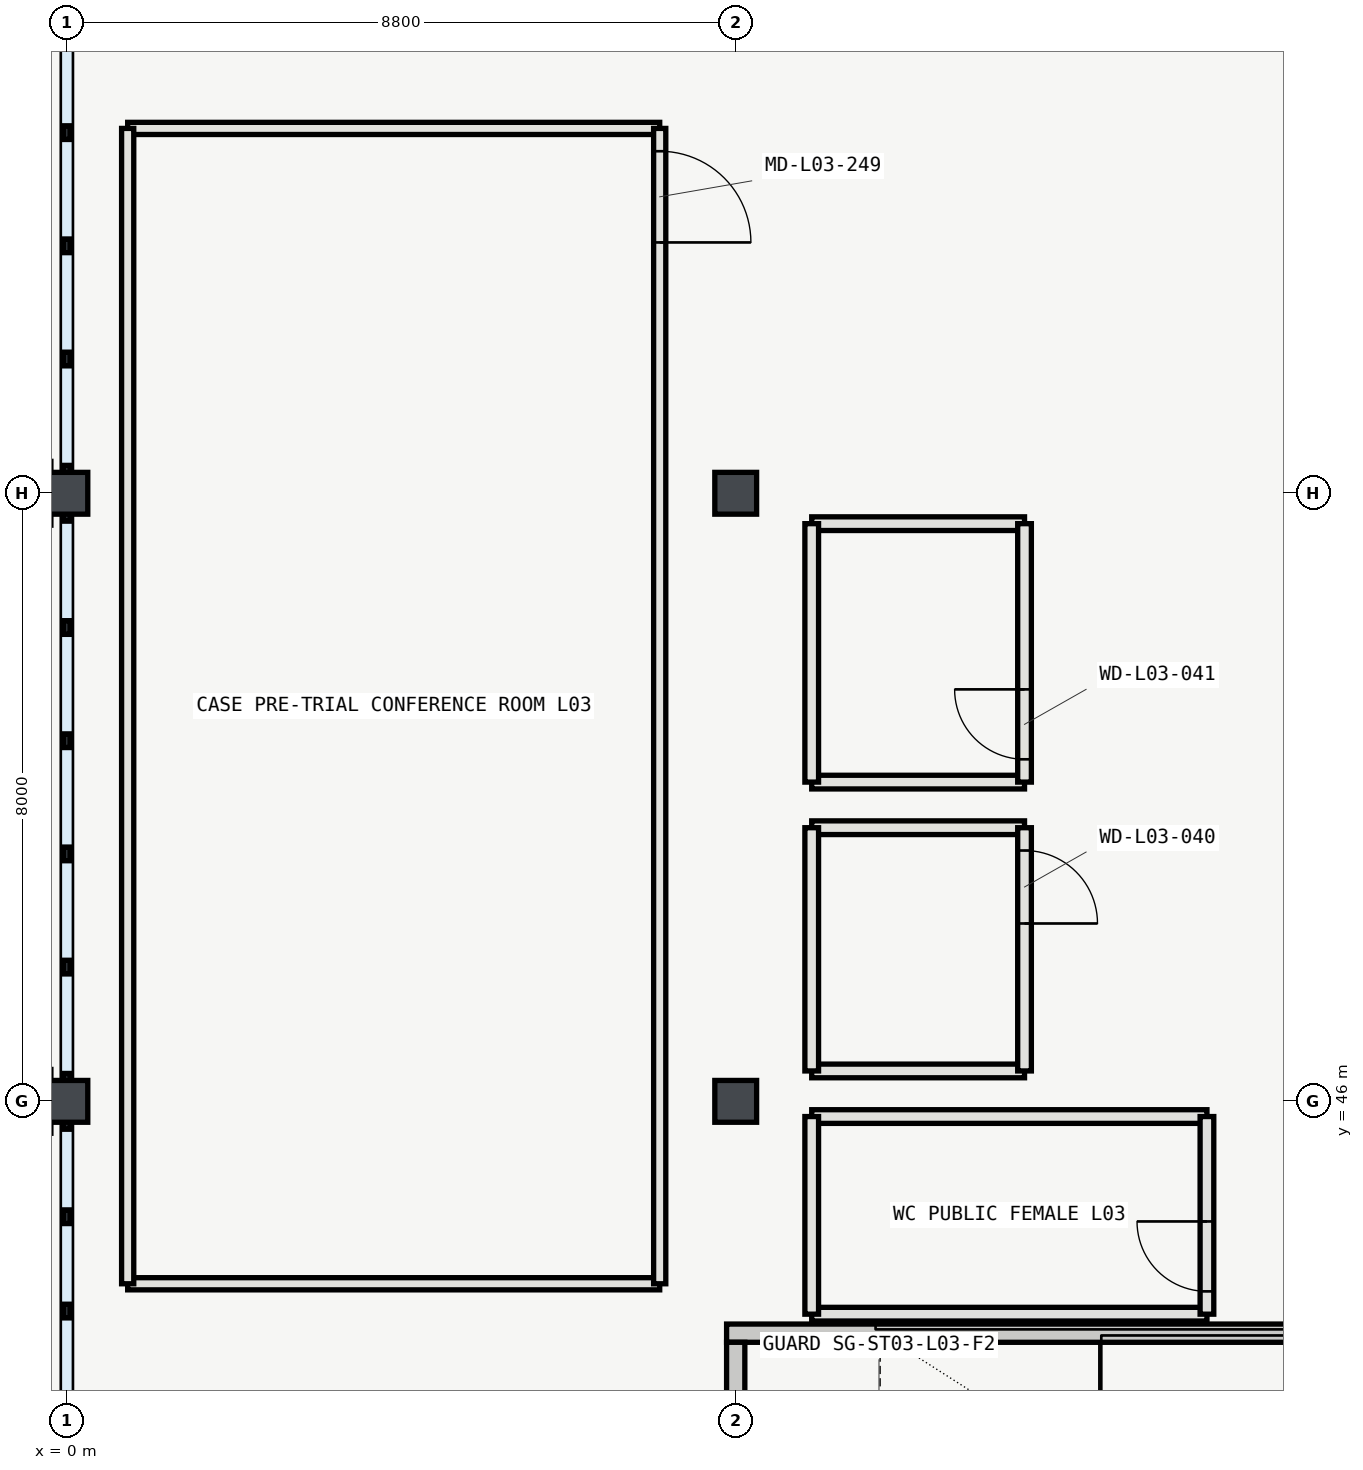
"""IFC4 building model, lengths in metres.
Left out: names, types, materials, properties, quantities, classifications, styles, units other than length and angle.
Written with IfcOpenShell. Run it as: python <this file> out.ifc"""

import sys

from ifc_helpers import new_model, si_unit, direction, frame, frame_2d, origin, origin_2d, place, context, subcontext, project, spatial, rectangle, hollow_rectangle, extrude, element, fill, save


model = new_model("IFC4")
c1 = context("Model", 3, precision=1e-05, world=origin(), true_north=direction((0.0, 1.0)))
c2 = subcontext(c1, "Body", "Model", "MODEL_VIEW")
j1 = project(units=[si_unit("LENGTHUNIT", "METRE"), si_unit("PLANEANGLEUNIT", "RADIAN")], contexts=[c1])
p1 = place(None, origin())
s1 = spatial("IfcSite", under=j1, at=p1, CompositionType="ELEMENT")
p2 = place(p1, origin())
s2 = spatial("IfcBuilding", under=s1, at=p2, CompositionType="ELEMENT")
p3 = place(p2, frame((0.0, 0.0, 16.2)))
s3 = spatial("IfcBuildingStorey", under=s2, at=p3, CompositionType="ELEMENT", Elevation=16.2)
for number, where, z_axis, x_axis in (
    (1, (0.0, 46.0, 0.0), (0.0, 0.0, 1.0), (1.0, 0.0, 0.0)),
    (2, (0.0, 54.0, 0.0), (0.0, 0.0, 1.0), (1.0, 0.0, 0.0)),
    (3, (8.8, 46.0, 0.0), (0.0, 0.0, 1.0), (1.0, 0.0, 0.0)),
    (4, (8.8, 54.0, 0.0), (0.0, 0.0, 1.0), (1.0, 0.0, 0.0)),
):
    element("IfcColumn", number, at=place(p3, frame(where, z_axis=z_axis, x_axis=x_axis)), inside=s3, PredefinedType="COLUMN", context=c2, shape_type="SweptSolid", body=[
        extrude(hollow_rectangle(XDim=0.55, YDim=0.55, WallThickness=0.022, InnerFilletRadius=0.022, OuterFilletRadius=0.044, at=origin_2d()), origin(), (0.0, 0.0, 1.0), 4.2),
    ])
for number, where, z_axis, x_axis in (
    (5, (9.8, 46.4, 0.0), (0.0, 0.0, 1.0), (1.0, 0.0, 0.0)),
    (6, (12.6, 49.6, 0.0), (0.0, 0.0, 1.0), (-1.0, 0.0, 0.0)),
):
    element("IfcWall", number, at=place(p3, frame(where, z_axis=z_axis, x_axis=x_axis)), inside=s3, PredefinedType="PLUMBINGWALL", context=c2, shape_type="SweptSolid", body=[
        extrude(rectangle(XDim=2.8, YDim=0.18, at=frame_2d((1.4, 0.0))), origin(), (0.0, 0.0, 1.0), 3.92),
    ])
p4 = place(p3, frame((9.8, 49.6, 0.0), z_axis=(0.0, 0.0, 1.0), x_axis=(0.0, -1.0, 0.0)))
e7 = element("IfcWall", 7, at=p4, inside=s3, PredefinedType="PLUMBINGWALL", context=c2, shape_type="SweptSolid", body=[
    extrude(rectangle(XDim=3.2, YDim=0.18, at=frame_2d((1.6, 0.0))), origin(), (0.0, 0.0, 1.0), 3.92),
])
p5 = place(p3, frame((12.6, 46.4, 0.0), z_axis=(0.0, 0.0, 1.0), x_axis=(0.0, 1.0, 0.0)))
e8 = element("IfcWall", 8, at=p5, inside=s3, PredefinedType="PLUMBINGWALL", context=c2, shape_type="SweptSolid", body=[
    extrude(rectangle(XDim=3.2, YDim=0.18, at=frame_2d((1.6, 0.0))), origin(), (0.0, 0.0, 1.0), 3.92),
])
p6 = place(p5, frame((1.94, 0.0, 0.0)))
e9 = element("IfcOpeningElement", 9, at=p6, cuts=e8, PredefinedType="OPENING", context=c2, shape_type="SweptSolid", body=[
    extrude(rectangle(XDim=0.96, YDim=2.1, at=frame_2d((0.48, 1.05))), frame((0.0, 0.1, 0.0), z_axis=(0.0, -1.0, 0.0), x_axis=(1.0, 0.0, 0.0)), (0.0, 0.0, 1.0), 0.2),
])
for number, where, z_axis, x_axis in (
    (10, (9.8, 50.2, 0.0), (0.0, 0.0, 1.0), (1.0, 0.0, 0.0)),
    (11, (12.6, 53.6, 0.0), (0.0, 0.0, 1.0), (-1.0, 0.0, 0.0)),
):
    element("IfcWall", number, at=place(p3, frame(where, z_axis=z_axis, x_axis=x_axis)), inside=s3, PredefinedType="PLUMBINGWALL", context=c2, shape_type="SweptSolid", body=[
        extrude(rectangle(XDim=2.8, YDim=0.18, at=frame_2d((1.4, 0.0))), origin(), (0.0, 0.0, 1.0), 3.92),
    ])
p7 = place(p3, frame((9.8, 53.6, 0.0), z_axis=(0.0, 0.0, 1.0), x_axis=(0.0, -1.0, 0.0)))
e12 = element("IfcWall", 12, at=p7, inside=s3, PredefinedType="PLUMBINGWALL", context=c2, shape_type="SweptSolid", body=[
    extrude(rectangle(XDim=3.4, YDim=0.18, at=frame_2d((1.7, 0.0))), origin(), (0.0, 0.0, 1.0), 3.92),
])
p8 = place(p3, frame((12.6, 50.2, 0.0), z_axis=(0.0, 0.0, 1.0), x_axis=(0.0, 1.0, 0.0)))
e13 = element("IfcWall", 13, at=p8, inside=s3, PredefinedType="PLUMBINGWALL", context=c2, shape_type="SweptSolid", body=[
    extrude(rectangle(XDim=3.4, YDim=0.18, at=frame_2d((1.7, 0.0))), origin(), (0.0, 0.0, 1.0), 3.92),
])
p9 = place(p8, frame((0.3, 0.0, 0.0)))
e14 = element("IfcOpeningElement", 14, at=p9, cuts=e13, PredefinedType="OPENING", context=c2, shape_type="SweptSolid", body=[
    extrude(rectangle(XDim=0.92, YDim=2.1, at=frame_2d((0.46, 1.05))), frame((0.0, 0.1, 0.0), z_axis=(0.0, -1.0, 0.0), x_axis=(1.0, 0.0, 0.0)), (0.0, 0.0, 1.0), 0.2),
])
p10 = place(p3, frame((9.8, 43.2, 0.0), z_axis=(0.0, 0.0, 1.0), x_axis=(1.0, 0.0, 0.0)))
e15 = element("IfcWall", 15, at=p10, inside=s3, PredefinedType="PLUMBINGWALL", context=c2, shape_type="SweptSolid", body=[
    extrude(rectangle(XDim=5.2, YDim=0.18, at=frame_2d((2.6, 0.0))), origin(), (0.0, 0.0, 1.0), 3.92),
])
p11 = place(p3, frame((15.0, 45.8, 0.0), z_axis=(0.0, 0.0, 1.0), x_axis=(-1.0, 0.0, 0.0)))
e16 = element("IfcWall", 16, at=p11, inside=s3, PredefinedType="PLUMBINGWALL", context=c2, shape_type="SweptSolid", body=[
    extrude(rectangle(XDim=5.2, YDim=0.18, at=frame_2d((2.6, 0.0))), origin(), (0.0, 0.0, 1.0), 3.636),
])
p12 = place(p3, frame((9.8, 45.8, 0.0), z_axis=(0.0, 0.0, 1.0), x_axis=(0.0, -1.0, 0.0)))
e17 = element("IfcWall", 17, at=p12, inside=s3, PredefinedType="PLUMBINGWALL", context=c2, shape_type="SweptSolid", body=[
    extrude(rectangle(XDim=2.6, YDim=0.18, at=frame_2d((1.3, 0.0))), origin(), (0.0, 0.0, 1.0), 3.92),
])
p13 = place(p3, frame((15.0, 43.2, 0.0), z_axis=(0.0, 0.0, 1.0), x_axis=(0.0, 1.0, 0.0)))
e18 = element("IfcWall", 18, at=p13, inside=s3, PredefinedType="PLUMBINGWALL", context=c2, shape_type="SweptSolid", body=[
    extrude(rectangle(XDim=2.6, YDim=0.18, at=frame_2d((1.3, 0.0))), origin(), (0.0, 0.0, 1.0), 3.92),
])
p14 = place(p13, frame((0.3, 0.0, 0.0)))
e19 = element("IfcOpeningElement", 19, at=p14, cuts=e18, PredefinedType="OPENING", context=c2, shape_type="SweptSolid", body=[
    extrude(rectangle(XDim=0.92, YDim=2.1, at=frame_2d((0.46, 1.05))), frame((0.0, 0.1, 0.0), z_axis=(0.0, -1.0, 0.0), x_axis=(1.0, 0.0, 0.0)), (0.0, 0.0, 1.0), 0.2),
])
for number, where, z_axis, x_axis in (
    (20, (0.8, 43.6, 0.0), (0.0, 0.0, 1.0), (1.0, 0.0, 0.0)),
    (21, (7.8, 58.8, 0.0), (0.0, 0.0, 1.0), (-1.0, 0.0, 0.0)),
):
    element("IfcWall", number, at=place(p3, frame(where, z_axis=z_axis, x_axis=x_axis)), inside=s3, PredefinedType="PARTITIONING", context=c2, shape_type="SweptSolid", body=[
        extrude(rectangle(XDim=7.0, YDim=0.16, at=frame_2d((3.5, 0.0))), origin(), (0.0, 0.0, 1.0), 3.92),
    ])
p15 = place(p3, frame((0.8, 58.8, 0.0), z_axis=(0.0, 0.0, 1.0), x_axis=(0.0, -1.0, 0.0)))
e22 = element("IfcWall", 22, at=p15, inside=s3, PredefinedType="PARTITIONING", context=c2, shape_type="SweptSolid", body=[
    extrude(rectangle(XDim=15.2, YDim=0.16, at=frame_2d((7.6, 0.0))), origin(), (0.0, 0.0, 1.0), 3.92),
])
p16 = place(p3, frame((7.8, 43.6, 0.0), z_axis=(0.0, 0.0, 1.0), x_axis=(0.0, 1.0, 0.0)))
e23 = element("IfcWall", 23, at=p16, inside=s3, PredefinedType="PARTITIONING", context=c2, shape_type="SweptSolid", body=[
    extrude(rectangle(XDim=15.2, YDim=0.16, at=frame_2d((7.6, 0.0))), origin(), (0.0, 0.0, 1.0), 3.92),
])
p17 = place(p16, frame((13.7, 0.0, 0.0)))
e24 = element("IfcOpeningElement", 24, at=p17, cuts=e23, PredefinedType="OPENING", context=c2, shape_type="SweptSolid", body=[
    extrude(rectangle(XDim=1.2, YDim=2.2, at=frame_2d((0.6, 1.1))), frame((0.0, 0.09, 0.0), z_axis=(0.0, -1.0, 0.0), x_axis=(1.0, 0.0, 0.0)), (0.0, 0.0, 1.0), 0.18),
])
p18 = place(p3, frame((17.72, 42.95, 0.0), z_axis=(0.0, 0.0, 1.0), x_axis=(-1.0, 0.0, 0.0)))
e25 = element("IfcWall", 25, at=p18, inside=s3, PredefinedType="SHEAR", context=c2, shape_type="SweptSolid", body=[
    extrude(rectangle(XDim=9.04, YDim=0.24, at=frame_2d((4.52, 0.0))), origin(), (0.0, 0.0, 1.0), 3.95),
])
p19 = place(p3, frame((8.8, 38.67, 0.0), z_axis=(0.0, 0.0, 1.0), x_axis=(0.0, 1.0, 0.0)))
e26 = element("IfcWall", 26, at=p19, inside=s3, PredefinedType="SHEAR", context=c2, shape_type="SweptSolid", body=[
    extrude(rectangle(XDim=4.16, YDim=0.24, at=frame_2d((2.08, 0.0))), origin(), (0.0, 0.0, 1.0), 3.95),
])
p20 = place(p19, frame((1.405, 0.0, 0.0)))
e27 = element("IfcOpeningElement", 27, at=p20, cuts=e26, PredefinedType="OPENING", context=c2, shape_type="SweptSolid", body=[
    extrude(rectangle(XDim=1.35, YDim=2.2, at=frame_2d((0.675, 1.1))), frame((0.0, 0.13, 0.0), z_axis=(0.0, -1.0, 0.0), x_axis=(1.0, 0.0, 0.0)), (0.0, 0.0, 1.0), 0.26),
])
p21 = place(p6, origin())
e28 = element("IfcDoor", 28, at=p21, inside=s3, OperationType="SINGLE_SWING_LEFT", PredefinedType="DOOR", context=c2, shape_type="SweptSolid", body=[
    extrude(rectangle(XDim=0.96, YDim=2.1, at=frame_2d((0.48, 1.05))), frame((0.0, 0.025, 0.0), z_axis=(0.0, -1.0, 0.0), x_axis=(1.0, 0.0, 0.0)), (0.0, 0.0, 1.0), 0.05),
])
fill(e9, e28)
p22 = place(p9, origin())
e29 = element("IfcDoor", 29, at=p22, inside=s3, OperationType="SINGLE_SWING_RIGHT", PredefinedType="DOOR", context=c2, shape_type="SweptSolid", body=[
    extrude(rectangle(XDim=0.92, YDim=2.1, at=frame_2d((0.46, 1.05))), frame((0.0, 0.025, 0.0), z_axis=(0.0, -1.0, 0.0), x_axis=(1.0, 0.0, 0.0)), (0.0, 0.0, 1.0), 0.05),
])
fill(e14, e29)
p23 = place(p14, origin())
e30 = element("IfcDoor", 30, at=p23, inside=s3, OperationType="SINGLE_SWING_RIGHT", PredefinedType="DOOR", context=c2, shape_type="SweptSolid", body=[
    extrude(rectangle(XDim=0.92, YDim=2.1, at=frame_2d((0.46, 1.05))), frame((0.0, 0.025, 0.0), z_axis=(0.0, -1.0, 0.0), x_axis=(1.0, 0.0, 0.0)), (0.0, 0.0, 1.0), 0.05),
])
fill(e19, e30)
p24 = place(p17, origin())
e31 = element("IfcDoor", 31, at=p24, inside=s3, OperationType="SINGLE_SWING_LEFT", PredefinedType="DOOR", context=c2, shape_type="SweptSolid", body=[
    extrude(rectangle(XDim=1.2, YDim=2.2, at=frame_2d((0.6, 1.1))), frame((0.0, 0.025, 0.0), z_axis=(0.0, -1.0, 0.0), x_axis=(1.0, 0.0, 0.0)), (0.0, 0.0, 1.0), 0.05),
])
fill(e24, e31)
save(model, sys.argv[1])
